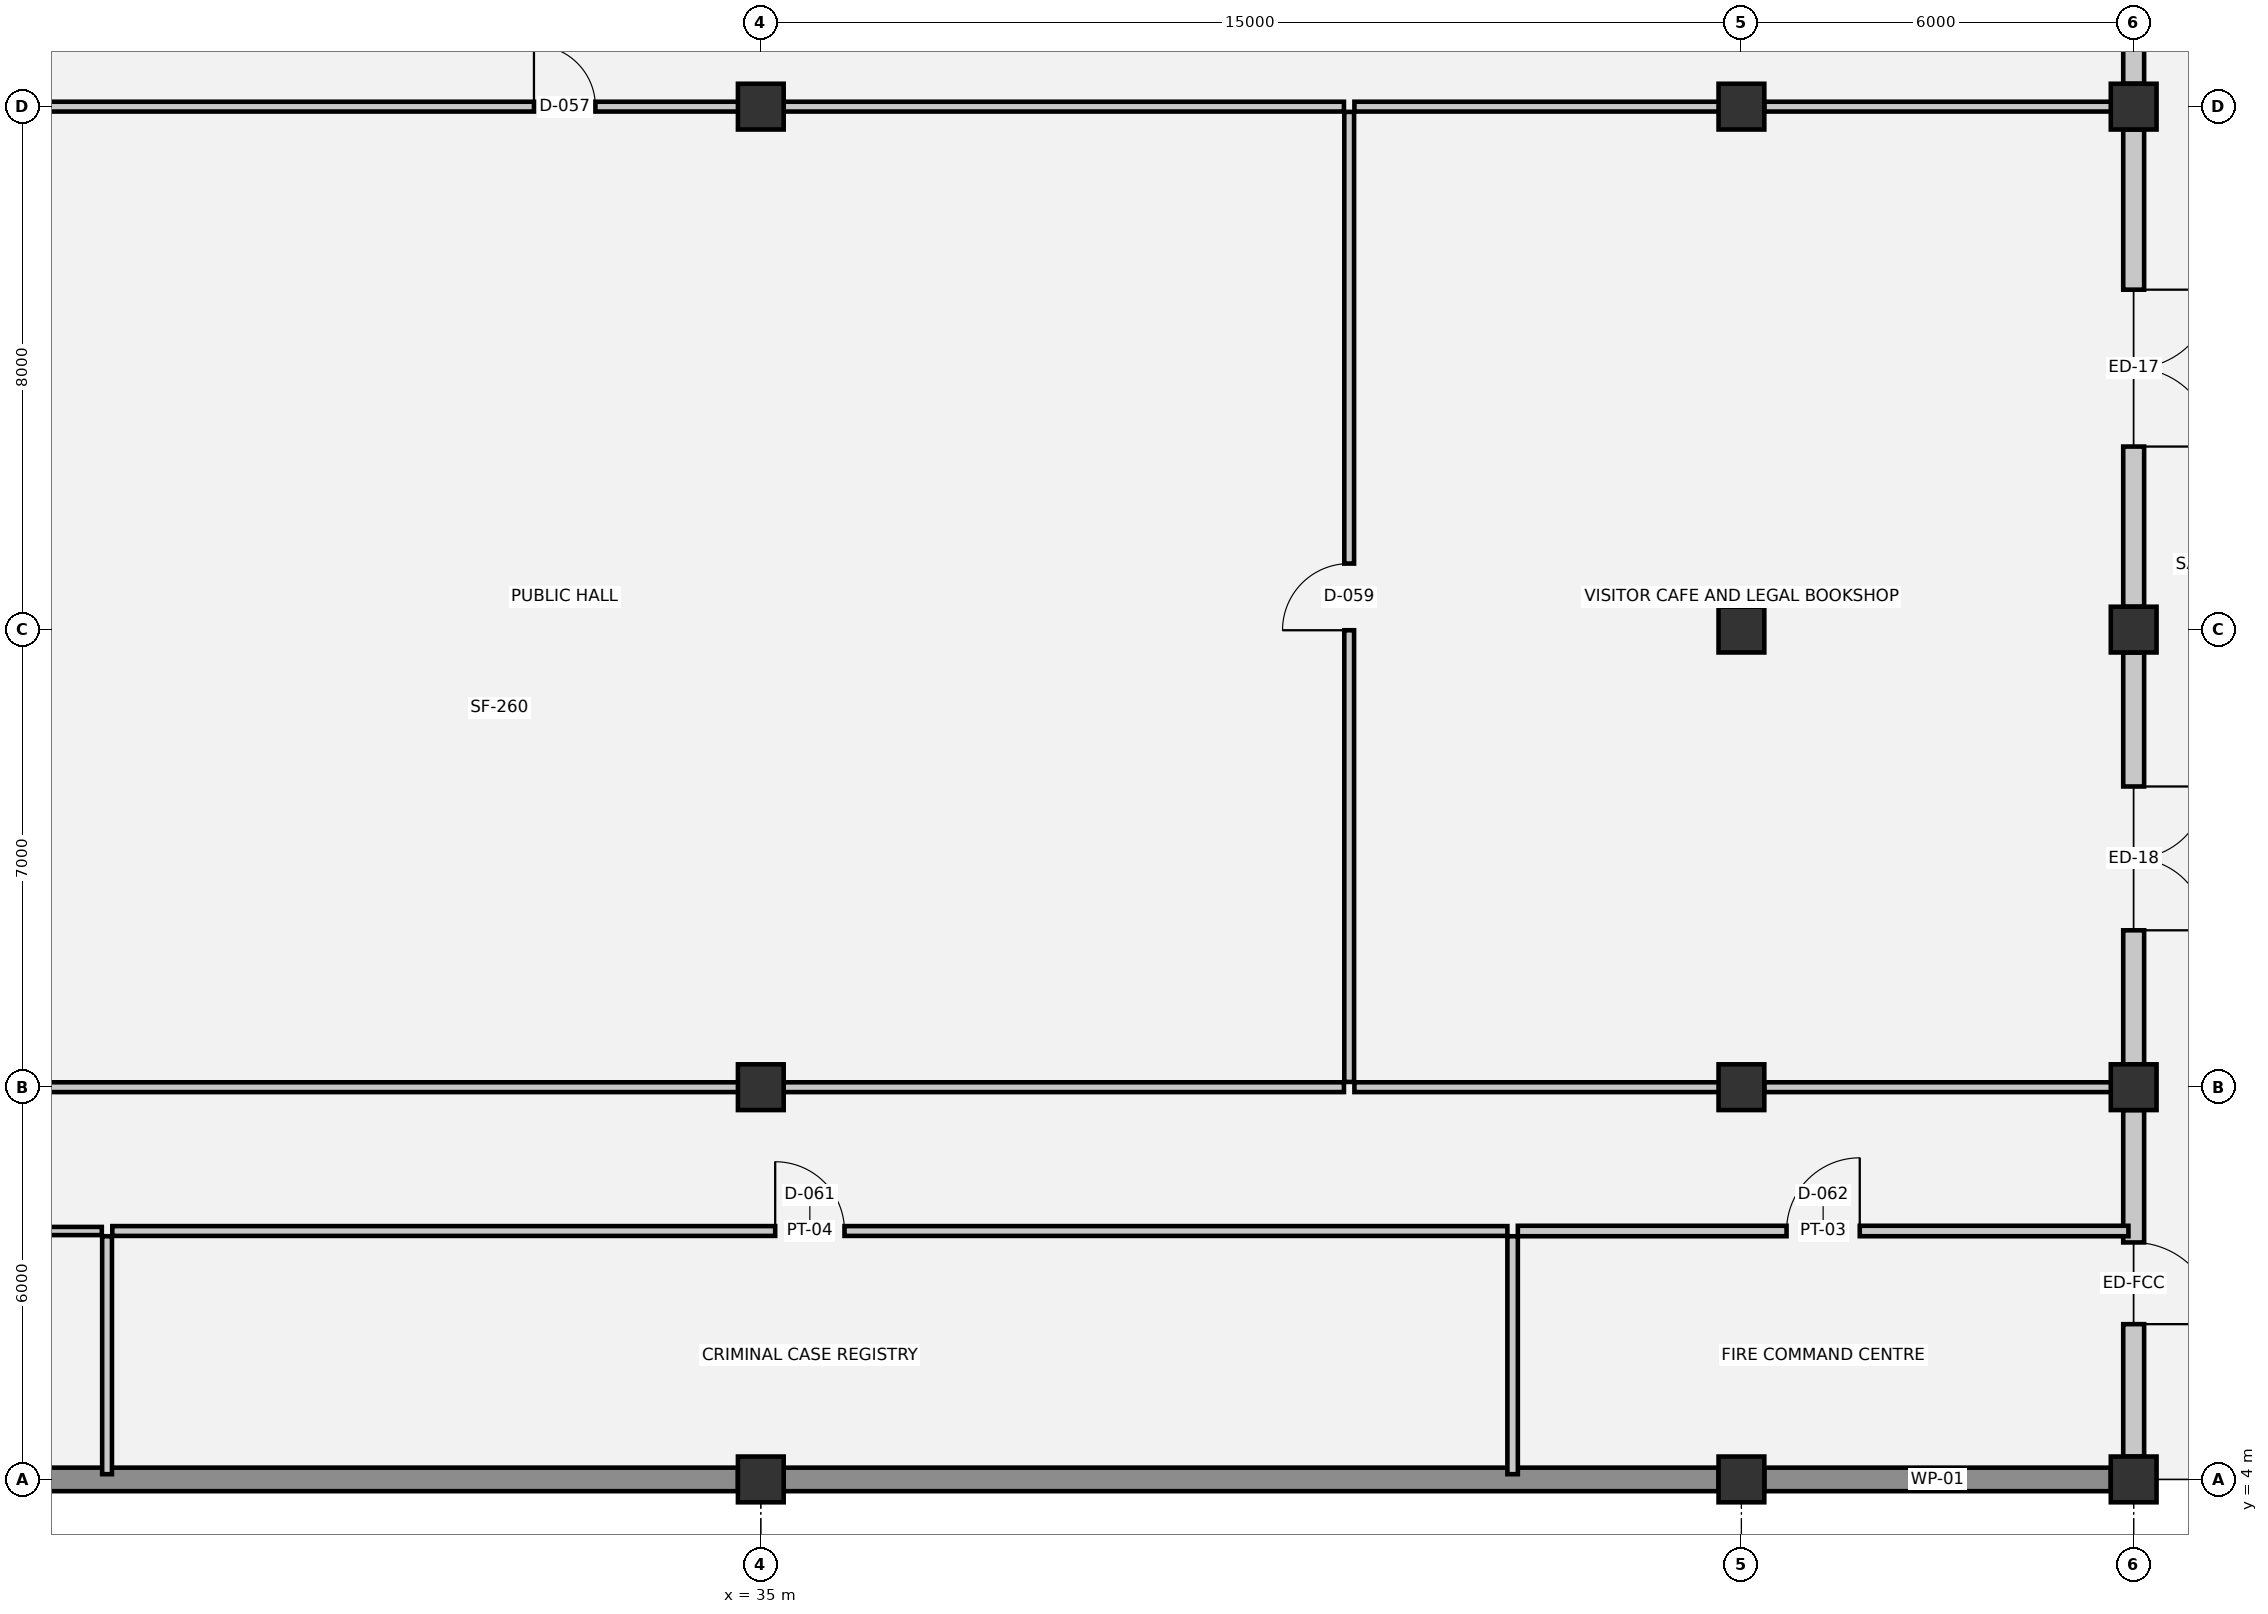
"""IFC4 building model, lengths in metres.
Left out: names, types, materials, properties, quantities, classifications, styles, units other than length and angle.
Written with IfcOpenShell. Run it as: python <this file> out.ifc"""

import sys

from ifc_helpers import new_model, si_unit, direction, frame, frame_2d, origin, origin_2d, place, context, subcontext, project, spatial, rectangle, extrude, element, fill, save


model = new_model("IFC4")
c1 = context("Model", 3, precision=1e-05, world=origin(), true_north=direction((0.0, 1.0)))
c2 = subcontext(c1, "Body", "Model", "MODEL_VIEW")
j1 = project(units=[si_unit("LENGTHUNIT", "METRE"), si_unit("PLANEANGLEUNIT", "RADIAN")], contexts=[c1])
p1 = place(None, origin())
s1 = spatial("IfcSite", under=j1, at=p1, CompositionType="ELEMENT")
p2 = place(p1, origin())
s2 = spatial("IfcBuilding", under=s1, at=p2, CompositionType="ELEMENT")
p3 = place(p2, origin())
s3 = spatial("IfcBuildingStorey", under=s2, at=p3, CompositionType="ELEMENT", Elevation=0.0)
for number, where, z_axis, x_axis in (
    (1, (35.0, 4.0, 0.0), (0.0, 0.0, 1.0), (1.0, 0.0, 0.0)),
    (2, (35.0, 10.0, 0.0), (0.0, 0.0, 1.0), (1.0, 0.0, 0.0)),
    (3, (35.0, 25.0, 0.0), (0.0, 0.0, 1.0), (1.0, 0.0, 0.0)),
    (4, (50.0, 4.0, 0.0), (0.0, 0.0, 1.0), (1.0, 0.0, 0.0)),
    (5, (50.0, 10.0, 0.0), (0.0, 0.0, 1.0), (1.0, 0.0, 0.0)),
    (6, (50.0, 17.0, 0.0), (0.0, 0.0, 1.0), (1.0, 0.0, 0.0)),
    (7, (50.0, 25.0, 0.0), (0.0, 0.0, 1.0), (1.0, 0.0, 0.0)),
    (8, (56.0, 4.0, 0.0), (0.0, 0.0, 1.0), (1.0, 0.0, 0.0)),
    (9, (56.0, 10.0, 0.0), (0.0, 0.0, 1.0), (1.0, 0.0, 0.0)),
    (10, (56.0, 17.0, 0.0), (0.0, 0.0, 1.0), (1.0, 0.0, 0.0)),
    (11, (56.0, 25.0, 0.0), (0.0, 0.0, 1.0), (1.0, 0.0, 0.0)),
):
    element("IfcColumn", number, at=place(p3, frame(where, z_axis=z_axis, x_axis=x_axis)), inside=s3, PredefinedType="COLUMN", context=c2, shape_type="SweptSolid", body=[
        extrude(rectangle(XDim=0.7, YDim=0.7, at=origin_2d()), origin(), (0.0, 0.0, 1.0), 5.4),
    ])
p4 = place(p3, frame((56.0, 31.65, 0.0), z_axis=(0.0, 0.0, 1.0), x_axis=(0.0, -1.0, 0.0)))
e12 = element("IfcWall", 12, at=p4, inside=s3, PredefinedType="SOLIDWALL", context=c2, shape_type="SweptSolid", body=[
    extrude(rectangle(XDim=6.3, YDim=0.32, at=frame_2d((3.15, 0.0))), origin(), (0.0, 0.0, 1.0), 4.16),
])
p5 = place(p4, frame((2.2, 0.0, 0.0)))
e13 = element("IfcOpeningElement", 13, at=p5, cuts=e12, PredefinedType="OPENING", context=c2, shape_type="SweptSolid", body=[
    extrude(rectangle(XDim=1.9, YDim=2.25, at=frame_2d((0.95, 1.125))), frame((0.0, 0.17, 0.0), z_axis=(0.0, -1.0, 0.0), x_axis=(1.0, 0.0, 0.0)), (0.0, 0.0, 1.0), 0.34),
])
p6 = place(p3, frame((56.0, 24.65, 0.0), z_axis=(0.0, 0.0, 1.0), x_axis=(0.0, -1.0, 0.0)))
e14 = element("IfcWall", 14, at=p6, inside=s3, PredefinedType="SOLIDWALL", context=c2, shape_type="SweptSolid", body=[
    extrude(rectangle(XDim=7.3, YDim=0.32, at=frame_2d((3.65, 0.0))), origin(), (0.0, 0.0, 1.0), 4.16),
])
p7 = place(p6, frame((2.45, 0.0, 0.0)))
e15 = element("IfcOpeningElement", 15, at=p7, cuts=e14, PredefinedType="OPENING", context=c2, shape_type="SweptSolid", body=[
    extrude(rectangle(XDim=2.4, YDim=2.4, at=frame_2d((1.2, 1.2))), frame((0.0, 0.17, 0.0), z_axis=(0.0, -1.0, 0.0), x_axis=(1.0, 0.0, 0.0)), (0.0, 0.0, 1.0), 0.34),
])
p8 = place(p3, frame((56.0, 16.65, 0.0), z_axis=(0.0, 0.0, 1.0), x_axis=(0.0, -1.0, 0.0)))
e16 = element("IfcWall", 16, at=p8, inside=s3, PredefinedType="SOLIDWALL", context=c2, shape_type="SweptSolid", body=[
    extrude(rectangle(XDim=6.3, YDim=0.32, at=frame_2d((3.15, 0.0))), origin(), (0.0, 0.0, 1.0), 4.16),
])
p9 = place(p8, frame((2.05, 0.0, 0.0)))
e17 = element("IfcOpeningElement", 17, at=p9, cuts=e16, PredefinedType="OPENING", context=c2, shape_type="SweptSolid", body=[
    extrude(rectangle(XDim=2.2, YDim=2.4, at=frame_2d((1.1, 1.2))), frame((0.0, 0.17, 0.0), z_axis=(0.0, -1.0, 0.0), x_axis=(1.0, 0.0, 0.0)), (0.0, 0.0, 1.0), 0.34),
])
p10 = place(p3, frame((56.0, 9.65, 0.0), z_axis=(0.0, 0.0, 1.0), x_axis=(0.0, -1.0, 0.0)))
e18 = element("IfcWall", 18, at=p10, inside=s3, PredefinedType="SOLIDWALL", context=c2, shape_type="SweptSolid", body=[
    extrude(rectangle(XDim=5.3, YDim=0.32, at=frame_2d((2.65, 0.0))), origin(), (0.0, 0.0, 1.0), 4.16),
])
p11 = place(p10, frame((2.025, 0.0, 0.0)))
e19 = element("IfcOpeningElement", 19, at=p11, cuts=e18, PredefinedType="OPENING", context=c2, shape_type="SweptSolid", body=[
    extrude(rectangle(XDim=1.25, YDim=2.15, at=frame_2d((0.625, 1.075))), frame((0.0, 0.17, 0.0), z_axis=(0.0, -1.0, 0.0), x_axis=(1.0, 0.0, 0.0)), (0.0, 0.0, 1.0), 0.34),
])
p12 = place(p3, frame((55.65, 4.0, 0.0), z_axis=(0.0, 0.0, 1.0), x_axis=(-1.0, 0.0, 0.0)))
e20 = element("IfcWall", 20, at=p12, inside=s3, PredefinedType="SOLIDWALL", context=c2, shape_type="SweptSolid", body=[
    extrude(rectangle(XDim=5.3, YDim=0.36, at=frame_2d((2.65, 0.0))), origin(), (0.0, 0.0, 1.0), 5.14),
])
for number, where, z_axis, x_axis in (
    (21, (49.65, 4.0, 0.0), (0.0, 0.0, 1.0), (-1.0, 0.0, 0.0)),
    (22, (34.65, 4.0, 0.0), (0.0, 0.0, 1.0), (-1.0, 0.0, 0.0)),
):
    element("IfcWall", number, at=place(p3, frame(where, z_axis=z_axis, x_axis=x_axis)), inside=s3, PredefinedType="SOLIDWALL", context=c2, shape_type="SweptSolid", body=[
        extrude(rectangle(XDim=14.3, YDim=0.36, at=frame_2d((7.15, 0.0))), origin(), (0.0, 0.0, 1.0), 5.14),
    ])
p13 = place(p3, frame((6.08, 7.8, 0.0), z_axis=(0.0, 0.0, 1.0), x_axis=(1.0, 0.0, 0.0)))
e23 = element("IfcWall", 23, at=p13, inside=s3, PredefinedType="PARTITIONING", context=c2, shape_type="SweptSolid", body=[
    extrude(rectangle(XDim=18.84, YDim=0.125, at=frame_2d((9.42, 0.0))), origin(), (0.0, 0.0, 1.0), 5.04),
])
p14 = place(p13, frame((8.9, 0.0, 0.0)))
e24 = element("IfcOpeningElement", 24, at=p14, cuts=e23, PredefinedType="OPENING", context=c2, shape_type="SweptSolid", body=[
    extrude(rectangle(XDim=1.04, YDim=2.15, at=frame_2d((0.52, 1.075))), frame((0.0, 0.073, 0.0), z_axis=(0.0, -1.0, 0.0), x_axis=(1.0, 0.0, 0.0)), (0.0, 0.0, 1.0), 0.145),
])
p15 = place(p3, frame((25.08, 7.8, 0.0), z_axis=(0.0, 0.0, 1.0), x_axis=(1.0, 0.0, 0.0)))
e25 = element("IfcWall", 25, at=p15, inside=s3, PredefinedType="PARTITIONING", context=c2, shape_type="SweptSolid", body=[
    extrude(rectangle(XDim=21.34, YDim=0.15, at=frame_2d((10.67, 0.0))), origin(), (0.0, 0.0, 1.0), 5.04),
])
p16 = place(p15, frame((10.14, 0.0, 0.0)))
e26 = element("IfcOpeningElement", 26, at=p16, cuts=e25, PredefinedType="OPENING", context=c2, shape_type="SweptSolid", body=[
    extrude(rectangle(XDim=1.06, YDim=2.2, at=frame_2d((0.53, 1.1))), frame((0.0, 0.085, 0.0), z_axis=(0.0, -1.0, 0.0), x_axis=(1.0, 0.0, 0.0)), (0.0, 0.0, 1.0), 0.17),
])
p17 = place(p3, frame((46.58, 7.8, 0.0), z_axis=(0.0, 0.0, 1.0), x_axis=(1.0, 0.0, 0.0)))
e27 = element("IfcWall", 27, at=p17, inside=s3, PredefinedType="PARTITIONING", context=c2, shape_type="SweptSolid", body=[
    extrude(rectangle(XDim=9.34, YDim=0.16, at=frame_2d((4.67, 0.0))), origin(), (0.0, 0.0, 1.0), 5.04),
])
p18 = place(p17, frame((4.11, 0.0, 0.0)))
e28 = element("IfcOpeningElement", 28, at=p18, cuts=e27, PredefinedType="OPENING", context=c2, shape_type="SweptSolid", body=[
    extrude(rectangle(XDim=1.12, YDim=2.2, at=frame_2d((0.56, 1.1))), frame((0.0, 0.09, 0.0), z_axis=(0.0, -1.0, 0.0), x_axis=(1.0, 0.0, 0.0)), (0.0, 0.0, 1.0), 0.18),
])
p19 = place(p3, frame((20.08, 10.0, 0.0), z_axis=(0.0, 0.0, 1.0), x_axis=(1.0, 0.0, 0.0)))
e29 = element("IfcWall", 29, at=p19, inside=s3, PredefinedType="PARTITIONING", context=c2, shape_type="SweptSolid", body=[
    extrude(rectangle(XDim=23.84, YDim=0.15, at=frame_2d((11.92, 0.0))), origin(), (0.0, 0.0, 1.0), 4.18),
])
p20 = place(p3, frame((44.08, 10.0, 0.0), z_axis=(0.0, 0.0, 1.0), x_axis=(1.0, 0.0, 0.0)))
e30 = element("IfcWall", 30, at=p20, inside=s3, PredefinedType="PARTITIONING", context=c2, shape_type="SweptSolid", body=[
    extrude(rectangle(XDim=6.27, YDim=0.15, at=frame_2d((3.135, 0.0))), origin(), (0.0, 0.0, 1.0), 4.18),
])
p21 = place(p3, frame((50.35, 10.0, 0.0), z_axis=(0.0, 0.0, 1.0), x_axis=(1.0, 0.0, 0.0)))
e31 = element("IfcWall", 31, at=p21, inside=s3, PredefinedType="PARTITIONING", context=c2, shape_type="SweptSolid", body=[
    extrude(rectangle(XDim=5.57, YDim=0.15, at=frame_2d((2.785, 0.0))), origin(), (0.0, 0.0, 1.0), 4.43),
])
p22 = place(p3, frame((20.08, 25.0, 0.0), z_axis=(0.0, 0.0, 1.0), x_axis=(1.0, 0.0, 0.0)))
e32 = element("IfcWall", 32, at=p22, inside=s3, PredefinedType="PARTITIONING", context=c2, shape_type="SweptSolid", body=[
    extrude(rectangle(XDim=23.84, YDim=0.15, at=frame_2d((11.92, 0.0))), origin(), (0.0, 0.0, 1.0), 4.18),
])
p23 = place(p22, frame((11.45, 0.0, 0.0)))
e33 = element("IfcOpeningElement", 33, at=p23, cuts=e32, PredefinedType="OPENING", context=c2, shape_type="SweptSolid", body=[
    extrude(rectangle(XDim=0.94, YDim=2.15, at=frame_2d((0.47, 1.075))), frame((0.0, 0.085, 0.0), z_axis=(0.0, -1.0, 0.0), x_axis=(1.0, 0.0, 0.0)), (0.0, 0.0, 1.0), 0.17),
])
p24 = place(p3, frame((44.08, 25.0, 0.0), z_axis=(0.0, 0.0, 1.0), x_axis=(1.0, 0.0, 0.0)))
e34 = element("IfcWall", 34, at=p24, inside=s3, PredefinedType="PARTITIONING", context=c2, shape_type="SweptSolid", body=[
    extrude(rectangle(XDim=6.27, YDim=0.15, at=frame_2d((3.135, 0.0))), origin(), (0.0, 0.0, 1.0), 4.18),
])
p25 = place(p3, frame((50.35, 25.0, 0.0), z_axis=(0.0, 0.0, 1.0), x_axis=(1.0, 0.0, 0.0)))
e35 = element("IfcWall", 35, at=p25, inside=s3, PredefinedType="PARTITIONING", context=c2, shape_type="SweptSolid", body=[
    extrude(rectangle(XDim=5.57, YDim=0.15, at=frame_2d((2.785, 0.0))), origin(), (0.0, 0.0, 1.0), 4.43),
])
p26 = place(p3, frame((25.0, 4.08, 0.0), z_axis=(0.0, 0.0, 1.0), x_axis=(0.0, 1.0, 0.0)))
e36 = element("IfcWall", 36, at=p26, inside=s3, PredefinedType="PARTITIONING", context=c2, shape_type="SweptSolid", body=[
    extrude(rectangle(XDim=3.64, YDim=0.15, at=frame_2d((1.82, 0.0))), origin(), (0.0, 0.0, 1.0), 5.04),
])
p27 = place(p3, frame((44.0, 10.08, 0.0), z_axis=(0.0, 0.0, 1.0), x_axis=(0.0, 1.0, 0.0)))
e37 = element("IfcWall", 37, at=p27, inside=s3, PredefinedType="PARTITIONING", context=c2, shape_type="SweptSolid", body=[
    extrude(rectangle(XDim=14.84, YDim=0.15, at=frame_2d((7.42, 0.0))), origin(), (0.0, 0.0, 1.0), 5.04),
])
p28 = place(p27, frame((6.91, 0.0, 0.0)))
e38 = element("IfcOpeningElement", 38, at=p28, cuts=e37, PredefinedType="OPENING", context=c2, shape_type="SweptSolid", body=[
    extrude(rectangle(XDim=1.02, YDim=2.15, at=frame_2d((0.51, 1.075))), frame((0.0, 0.085, 0.0), z_axis=(0.0, -1.0, 0.0), x_axis=(1.0, 0.0, 0.0)), (0.0, 0.0, 1.0), 0.17),
])
p29 = place(p3, frame((46.5, 4.08, 0.0), z_axis=(0.0, 0.0, 1.0), x_axis=(0.0, 1.0, 0.0)))
e39 = element("IfcWall", 39, at=p29, inside=s3, PredefinedType="PARTITIONING", context=c2, shape_type="SweptSolid", body=[
    extrude(rectangle(XDim=3.64, YDim=0.16, at=frame_2d((1.82, 0.0))), origin(), (0.0, 0.0, 1.0), 5.04),
])
p30 = place(p7, origin())
e40 = element("IfcDoor", 40, at=p30, inside=s3, OperationType="DOUBLE_DOOR_SINGLE_SWING", PredefinedType="DOOR", context=c2, shape_type="SweptSolid", body=[
    extrude(rectangle(XDim=2.4, YDim=2.4, at=frame_2d((1.2, 1.2))), frame((0.0, 0.025, 0.0), z_axis=(0.0, -1.0, 0.0), x_axis=(1.0, 0.0, 0.0)), (0.0, 0.0, 1.0), 0.05),
])
fill(e15, e40)
p31 = place(p9, origin())
e41 = element("IfcDoor", 41, at=p31, inside=s3, OperationType="DOUBLE_DOOR_SINGLE_SWING", PredefinedType="DOOR", context=c2, shape_type="SweptSolid", body=[
    extrude(rectangle(XDim=2.2, YDim=2.4, at=frame_2d((1.1, 1.2))), frame((0.0, 0.025, 0.0), z_axis=(0.0, -1.0, 0.0), x_axis=(1.0, 0.0, 0.0)), (0.0, 0.0, 1.0), 0.05),
])
fill(e17, e41)
p32 = place(p11, origin())
e42 = element("IfcDoor", 42, at=p32, inside=s3, OperationType="SINGLE_SWING_RIGHT", PredefinedType="DOOR", context=c2, shape_type="SweptSolid", body=[
    extrude(rectangle(XDim=1.25, YDim=2.15, at=frame_2d((0.625, 1.075))), frame((0.0, 0.025, 0.0), z_axis=(0.0, -1.0, 0.0), x_axis=(1.0, 0.0, 0.0)), (0.0, 0.0, 1.0), 0.05),
])
fill(e19, e42)
p33 = place(p23, origin())
e43 = element("IfcDoor", 43, at=p33, inside=s3, OperationType="SINGLE_SWING_LEFT", PredefinedType="DOOR", context=c2, shape_type="SweptSolid", body=[
    extrude(rectangle(XDim=0.94, YDim=2.15, at=frame_2d((0.47, 1.075))), frame((0.0, 0.025, 0.0), z_axis=(0.0, -1.0, 0.0), x_axis=(1.0, 0.0, 0.0)), (0.0, 0.0, 1.0), 0.05),
])
fill(e33, e43)
p34 = place(p28, origin())
e44 = element("IfcDoor", 44, at=p34, inside=s3, OperationType="SINGLE_SWING_LEFT", PredefinedType="DOOR", context=c2, shape_type="SweptSolid", body=[
    extrude(rectangle(XDim=1.02, YDim=2.15, at=frame_2d((0.51, 1.075))), frame((0.0, 0.025, 0.0), z_axis=(0.0, -1.0, 0.0), x_axis=(1.0, 0.0, 0.0)), (0.0, 0.0, 1.0), 0.05),
])
fill(e38, e44)
p35 = place(p16, origin())
e45 = element("IfcDoor", 45, at=p35, inside=s3, OperationType="SINGLE_SWING_LEFT", PredefinedType="DOOR", context=c2, shape_type="SweptSolid", body=[
    extrude(rectangle(XDim=1.06, YDim=2.2, at=frame_2d((0.53, 1.1))), frame((0.0, 0.025, 0.0), z_axis=(0.0, -1.0, 0.0), x_axis=(1.0, 0.0, 0.0)), (0.0, 0.0, 1.0), 0.05),
])
fill(e26, e45)
p36 = place(p18, origin())
e46 = element("IfcDoor", 46, at=p36, inside=s3, OperationType="SINGLE_SWING_RIGHT", PredefinedType="DOOR", context=c2, shape_type="SweptSolid", body=[
    extrude(rectangle(XDim=1.12, YDim=2.2, at=frame_2d((0.56, 1.1))), frame((0.0, 0.025, 0.0), z_axis=(0.0, -1.0, 0.0), x_axis=(1.0, 0.0, 0.0)), (0.0, 0.0, 1.0), 0.05),
])
fill(e28, e46)
save(model, sys.argv[1])
